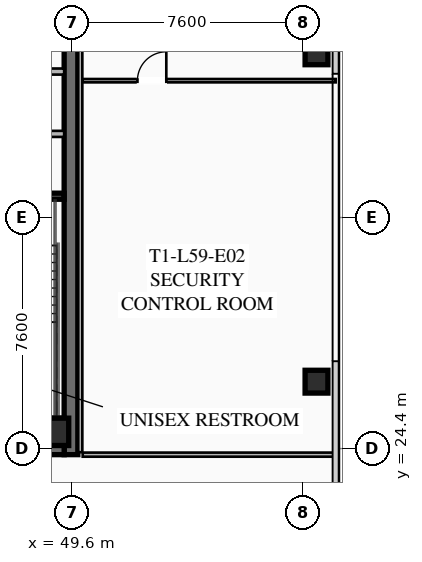
"""IFC4 building model, lengths in metres.
Left out: names, types, materials, properties, quantities, classifications, styles, units other than length and angle.
Written with IfcOpenShell. Run it as: python <this file> out.ifc"""

import sys

from ifc_helpers import new_model, si_unit, direction, frame, frame_2d, origin, origin_2d, place, context, subcontext, project, spatial, rectangle, hollow_rectangle, extrude, element, fill, save


model = new_model("IFC4")
c1 = context("Model", 3, precision=1e-05, world=origin(), true_north=direction((0.0, 1.0)))
c2 = subcontext(c1, "Body", "Model", "MODEL_VIEW")
j1 = project(units=[si_unit("LENGTHUNIT", "METRE"), si_unit("PLANEANGLEUNIT", "RADIAN")], contexts=[c1])
p1 = place(None, origin())
s1 = spatial("IfcSite", under=j1, at=p1, CompositionType="ELEMENT")
p2 = place(p1, origin())
s2 = spatial("IfcBuilding", under=s1, at=p2, CompositionType="ELEMENT")
p3 = place(p2, frame((0.0, 0.0, 218.4)))
s3 = spatial("IfcBuildingStorey", under=s2, at=p3, CompositionType="ELEMENT", Elevation=218.4)
p4 = place(p3, frame((49.575, 39.8, 0.0), z_axis=(0.0, 0.0, 1.0), x_axis=(0.0, -1.0, 0.0)))
e1 = element("IfcWall", 1, at=p4, inside=s3, PredefinedType="SHEAR", context=c2, shape_type="SweptSolid", body=[
    extrude(rectangle(XDim=15.6, YDim=0.45, at=frame_2d((7.8, 0.0))), origin(), (0.0, 0.0, 1.0), 3.55),
])
p5 = place(p3, frame((49.35, 24.425, 0.0), z_axis=(0.0, 0.0, 1.0), x_axis=(-1.0, 0.0, 0.0)))
e2 = element("IfcWall", 2, at=p5, inside=s3, PredefinedType="SHEAR", context=c2, shape_type="SweptSolid", body=[
    extrude(rectangle(XDim=14.7, YDim=0.45, at=frame_2d((7.35, 0.0))), origin(), (0.0, 0.0, 1.0), 3.55),
])
p6 = place(p5, frame((9.05, 0.0, 0.0)))
e3 = element("IfcOpeningElement", 3, at=p6, cuts=e2, PredefinedType="OPENING", context=c2, shape_type="SweptSolid", body=[
    extrude(rectangle(XDim=1.25, YDim=2.25, at=frame_2d((0.625, 1.125))), frame((0.0, 0.235, 0.0), z_axis=(0.0, -1.0, 0.0), x_axis=(1.0, 0.0, 0.0)), (0.0, 0.0, 1.0), 0.47),
])
p7 = place(p5, frame((4.0, 0.0, 0.0)))
e4 = element("IfcOpeningElement", 4, at=p7, cuts=e2, PredefinedType="OPENING", context=c2, shape_type="SweptSolid", body=[
    extrude(rectangle(XDim=1.25, YDim=2.25, at=frame_2d((0.625, 1.125))), frame((0.0, 0.235, 0.0), z_axis=(0.0, -1.0, 0.0), x_axis=(1.0, 0.0, 0.0)), (0.0, 0.0, 1.0), 0.47),
])
p8 = place(p3, frame((49.05, 24.95, 0.0), z_axis=(0.0, 0.0, 1.0), x_axis=(1.0, 0.0, 0.0)))
e5 = element("IfcColumn", 5, at=p8, inside=s3, PredefinedType="COLUMN", context=c2, shape_type="SweptSolid", body=[
    extrude(hollow_rectangle(XDim=0.9, YDim=0.9, WallThickness=0.04, at=origin_2d()), origin(), (0.0, 0.0, 1.0), 3.37),
])
for number, where, z_axis, x_axis in (
    (6, (57.65, 26.6, 0.0), (0.0, 0.0, 1.0), (1.0, 0.0, 0.0)),
    (7, (57.65, 37.4, 0.0), (0.0, 0.0, 1.0), (1.0, 0.0, 0.0)),
):
    element("IfcColumn", number, at=place(p3, frame(where, z_axis=z_axis, x_axis=x_axis)), inside=s3, PredefinedType="COLUMN", context=c2, shape_type="SweptSolid", body=[
        extrude(hollow_rectangle(XDim=0.75, YDim=0.75, WallThickness=0.032, at=origin_2d()), origin(), (0.0, 0.0, 1.0), 3.37),
    ])
for number, where, z_axis, x_axis in (
    (8, (45.7, 32.7, 0.0), (0.0, 0.0, 1.0), (1.0, 0.0, 0.0)),
    (9, (45.7, 25.3, 0.0), (0.0, 0.0, 1.0), (1.0, 0.0, 0.0)),
):
    element("IfcWall", number, at=place(p3, frame(where, z_axis=z_axis, x_axis=x_axis)), inside=s3, PredefinedType="SHEAR", context=c2, shape_type="SweptSolid", body=[
        extrude(rectangle(XDim=3.65, YDim=0.2, at=frame_2d((1.825, 0.0))), origin(), (0.0, 0.0, 1.0), 3.37),
    ])
for number, where, z_axis, x_axis in (
    (10, (46.05, 34.75, 0.0), (0.0, 0.0, 1.0), (1.0, 0.0, 0.0)),
    (11, (46.05, 36.8, 0.0), (0.0, 0.0, 1.0), (1.0, 0.0, 0.0)),
):
    element("IfcWall", number, at=place(p3, frame(where, z_axis=z_axis, x_axis=x_axis)), inside=s3, PredefinedType="SOLIDWALL", context=c2, shape_type="SweptSolid", body=[
        extrude(rectangle(XDim=3.3, YDim=0.2, at=frame_2d((1.65, 0.0))), origin(), (0.0, 0.0, 1.0), 3.37),
    ])
p9 = place(p3, frame((49.88, 39.72, 0.0), z_axis=(0.0, 0.0, 1.0), x_axis=(0.0, -1.0, 0.0)))
e12 = element("IfcWall", 12, at=p9, inside=s3, PredefinedType="PARTITIONING", context=c2, shape_type="SweptSolid", body=[
    extrude(rectangle(XDim=15.44, YDim=0.135, at=frame_2d((7.72, 0.0))), origin(), (0.0, 0.0, 1.0), 2.723),
])
p10 = place(p3, frame((49.96, 24.2, 0.0), z_axis=(0.0, 0.0, 1.0), x_axis=(1.0, 0.0, 0.0)))
e13 = element("IfcWall", 13, at=p10, inside=s3, PredefinedType="PARTITIONING", context=c2, shape_type="SweptSolid", body=[
    extrude(rectangle(XDim=8.32, YDim=0.135, at=frame_2d((4.16, 0.0))), origin(), (0.0, 0.0, 1.0), 2.723),
])
p11 = place(p3, frame((49.96, 36.5, 0.0), z_axis=(0.0, 0.0, 1.0), x_axis=(1.0, 0.0, 0.0)))
e14 = element("IfcWall", 14, at=p11, inside=s3, PredefinedType="PARTITIONING", context=c2, shape_type="SweptSolid", body=[
    extrude(rectangle(XDim=8.32, YDim=0.11, at=frame_2d((4.16, 0.0))), origin(), (0.0, 0.0, 1.0), 2.723),
])
p12 = place(p11, frame((1.8, 0.0, 0.0)))
e15 = element("IfcOpeningElement", 15, at=p12, cuts=e14, PredefinedType="OPENING", context=c2, shape_type="SweptSolid", body=[
    extrude(rectangle(XDim=0.95, YDim=2.05, at=frame_2d((0.475, 1.025))), frame((0.0, 0.065, 0.0), z_axis=(0.0, -1.0, 0.0), x_axis=(1.0, 0.0, 0.0)), (0.0, 0.0, 1.0), 0.13),
])
p13 = place(p12, origin())
e16 = element("IfcDoor", 16, at=p13, inside=s3, OperationType="SINGLE_SWING_RIGHT", PredefinedType="DOOR", context=c2, shape_type="SweptSolid", body=[
    extrude(rectangle(XDim=0.95, YDim=2.05, at=frame_2d((0.475, 1.025))), frame((0.0, 0.025, 0.0), z_axis=(0.0, -1.0, 0.0), x_axis=(1.0, 0.0, 0.0)), (0.0, 0.0, 1.0), 0.05),
])
fill(e15, e16)
save(model, sys.argv[1])
